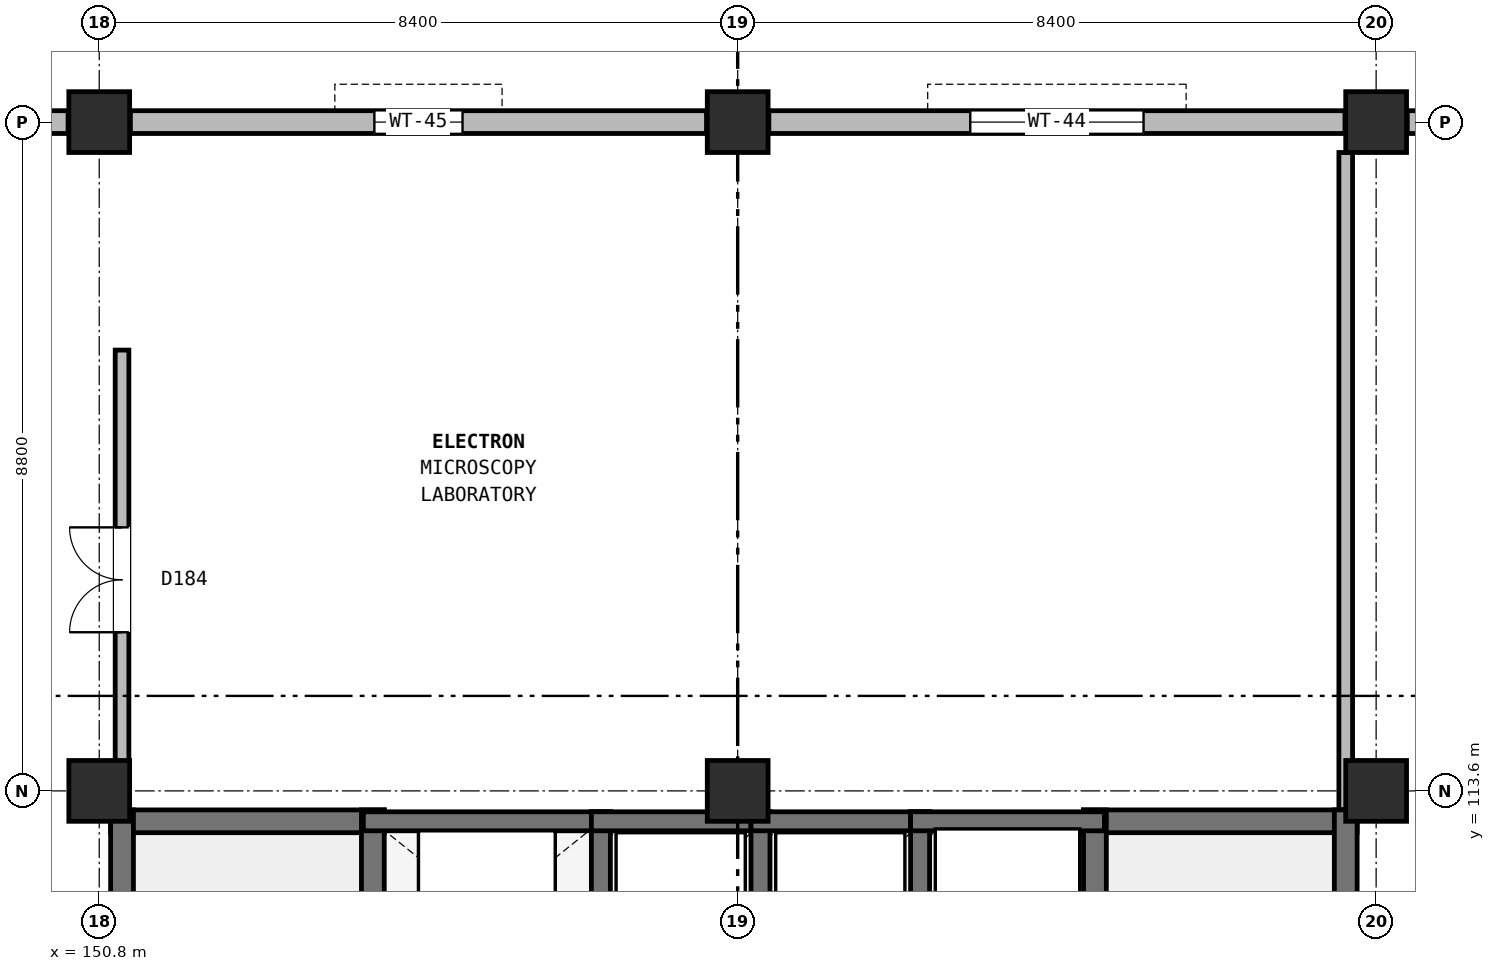
"""IFC4 building model, lengths in metres.
Left out: names, types, materials, properties, quantities, classifications, styles, units other than length and angle.
Written with IfcOpenShell. Run it as: python <this file> out.ifc"""

import sys

from ifc_helpers import new_model, si_unit, direction, frame, frame_2d, origin, origin_2d, place, context, subcontext, project, spatial, rectangle, extrude, element, fill, save


model = new_model("IFC4")
c1 = context("Model", 3, precision=1e-05, world=origin(), true_north=direction((0.0, 1.0)))
c2 = subcontext(c1, "Body", "Model", "MODEL_VIEW")
j1 = project(units=[si_unit("LENGTHUNIT", "METRE"), si_unit("PLANEANGLEUNIT", "RADIAN")], contexts=[c1])
p1 = place(None, origin())
s1 = spatial("IfcSite", under=j1, at=p1, CompositionType="ELEMENT")
p2 = place(p1, origin())
s2 = spatial("IfcBuilding", under=s1, at=p2, CompositionType="ELEMENT")
p3 = place(p2, frame((0.0, 0.0, 9.0)))
s3 = spatial("IfcBuildingStorey", under=s2, at=p3, CompositionType="ELEMENT", Elevation=9.0)
for number, where, z_axis, x_axis in (
    (1, (150.8, 113.6, 0.0), (0.0, 0.0, 1.0), (1.0, 0.0, 0.0)),
    (2, (150.8, 122.4, 0.0), (0.0, 0.0, 1.0), (1.0, 0.0, 0.0)),
    (3, (159.2, 113.6, 0.0), (0.0, 0.0, 1.0), (1.0, 0.0, 0.0)),
    (4, (159.2, 122.4, 0.0), (0.0, 0.0, 1.0), (1.0, 0.0, 0.0)),
    (5, (167.6, 113.6, 0.0), (0.0, 0.0, 1.0), (1.0, 0.0, 0.0)),
    (6, (167.6, 122.4, 0.0), (0.0, 0.0, 1.0), (1.0, 0.0, 0.0)),
):
    element("IfcColumn", number, at=place(p3, frame(where, z_axis=z_axis, x_axis=x_axis)), inside=s3, PredefinedType="COLUMN", context=c2, shape_type="SweptSolid", body=[
        extrude(rectangle(XDim=0.8, YDim=0.8, at=origin_2d()), origin(), (0.0, 0.0, 1.0), 4.2),
    ])
p4 = place(p3, frame((175.59, 122.4, 0.0), z_axis=(0.0, 0.0, 1.0), x_axis=(-1.0, 0.0, 0.0)))
e7 = element("IfcWall", 7, at=p4, inside=s3, PredefinedType="SOLIDWALL", context=c2, shape_type="SweptSolid", body=[
    extrude(rectangle(XDim=7.58, YDim=0.3, at=frame_2d((3.79, 0.0))), origin(), (0.0, 0.0, 1.0), 3.45),
])
p5 = place(p4, frame((1.005, 0.0, 0.9)))
e8 = element("IfcOpeningElement", 8, at=p5, cuts=e7, PredefinedType="OPENING", context=c2, shape_type="SweptSolid", body=[
    extrude(rectangle(XDim=1.98, YDim=2.32, at=frame_2d((0.99, 1.16))), frame((0.0, 0.16, 0.0), z_axis=(0.0, -1.0, 0.0), x_axis=(1.0, 0.0, 0.0)), (0.0, 0.0, 1.0), 0.32),
])
p6 = place(p3, frame((167.19, 122.4, 0.0), z_axis=(0.0, 0.0, 1.0), x_axis=(-1.0, 0.0, 0.0)))
e9 = element("IfcWall", 9, at=p6, inside=s3, PredefinedType="SOLIDWALL", context=c2, shape_type="SweptSolid", body=[
    extrude(rectangle(XDim=7.58, YDim=0.3, at=frame_2d((3.79, 0.0))), origin(), (0.0, 0.0, 1.0), 3.45),
])
p7 = place(p6, frame((2.65, 0.0, 0.9)))
e10 = element("IfcOpeningElement", 10, at=p7, cuts=e9, PredefinedType="OPENING", context=c2, shape_type="SweptSolid", body=[
    extrude(rectangle(XDim=2.28, YDim=2.36, at=frame_2d((1.14, 1.18))), frame((0.0, 0.16, 0.0), z_axis=(0.0, -1.0, 0.0), x_axis=(1.0, 0.0, 0.0)), (0.0, 0.0, 1.0), 0.32),
])
p8 = place(p3, frame((158.79, 122.4, 0.0), z_axis=(0.0, 0.0, 1.0), x_axis=(-1.0, 0.0, 0.0)))
e11 = element("IfcWall", 11, at=p8, inside=s3, PredefinedType="SOLIDWALL", context=c2, shape_type="SweptSolid", body=[
    extrude(rectangle(XDim=7.58, YDim=0.3, at=frame_2d((3.79, 0.0))), origin(), (0.0, 0.0, 1.0), 3.45),
])
p9 = place(p8, frame((3.21, 0.0, 0.9)))
e12 = element("IfcOpeningElement", 12, at=p9, cuts=e11, PredefinedType="OPENING", context=c2, shape_type="SweptSolid", body=[
    extrude(rectangle(XDim=1.16, YDim=1.74, at=frame_2d((0.58, 0.87))), frame((0.0, 0.16, 0.0), z_axis=(0.0, -1.0, 0.0), x_axis=(1.0, 0.0, 0.0)), (0.0, 0.0, 1.0), 0.32),
])
p10 = place(p3, frame((150.39, 122.4, 0.0), z_axis=(0.0, 0.0, 1.0), x_axis=(-1.0, 0.0, 0.0)))
e13 = element("IfcWall", 13, at=p10, inside=s3, PredefinedType="SOLIDWALL", context=c2, shape_type="SweptSolid", body=[
    extrude(rectangle(XDim=7.58, YDim=0.3, at=frame_2d((3.79, 0.0))), origin(), (0.0, 0.0, 1.0), 3.45),
])
p11 = place(p10, frame((3.13, 0.0, 0.9)))
e14 = element("IfcOpeningElement", 14, at=p11, cuts=e13, PredefinedType="OPENING", context=c2, shape_type="SweptSolid", body=[
    extrude(rectangle(XDim=1.32, YDim=1.78, at=frame_2d((0.66, 0.89))), frame((0.0, 0.16, 0.0), z_axis=(0.0, -1.0, 0.0), x_axis=(1.0, 0.0, 0.0)), (0.0, 0.0, 1.0), 0.32),
])
p12 = place(p3, frame((150.95, 113.2, 0.0), z_axis=(0.0, 0.0, 1.0), x_axis=(1.0, 0.0, 0.0)))
e15 = element("IfcWall", 15, at=p12, inside=s3, PredefinedType="SHEAR", context=c2, shape_type="SweptSolid", body=[
    extrude(rectangle(XDim=3.6, YDim=0.3, at=frame_2d((1.8, 0.0))), origin(), (0.0, 0.0, 1.0), 4.2),
])
p13 = place(p3, frame((151.1, 105.05, 0.0), z_axis=(0.0, 0.0, 1.0), x_axis=(0.0, 1.0, 0.0)))
e16 = element("IfcWall", 16, at=p13, inside=s3, PredefinedType="SHEAR", context=c2, shape_type="SweptSolid", body=[
    extrude(rectangle(XDim=8.3, YDim=0.3, at=frame_2d((4.15, 0.0))), origin(), (0.0, 0.0, 1.0), 4.2),
])
p14 = place(p3, frame((154.4, 105.05, 0.0), z_axis=(0.0, 0.0, 1.0), x_axis=(0.0, 1.0, 0.0)))
e17 = element("IfcWall", 17, at=p14, inside=s3, PredefinedType="SHEAR", context=c2, shape_type="SweptSolid", body=[
    extrude(rectangle(XDim=8.3, YDim=0.3, at=frame_2d((4.15, 0.0))), origin(), (0.0, 0.0, 1.0), 4.2),
])
p15 = place(p14, frame((0.45, 0.0, 0.0)))
e18 = element("IfcOpeningElement", 18, at=p15, cuts=e17, PredefinedType="OPENING", context=c2, shape_type="SweptSolid", body=[
    extrude(rectangle(XDim=1.1, YDim=2.2, at=frame_2d((0.55, 1.1))), frame((0.0, 0.16, 0.0), z_axis=(0.0, -1.0, 0.0), x_axis=(1.0, 0.0, 0.0)), (0.0, 0.0, 1.0), 0.32),
])
p16 = place(p3, frame((163.75, 113.2, 0.0), z_axis=(0.0, 0.0, 1.0), x_axis=(1.0, 0.0, 0.0)))
e19 = element("IfcWall", 19, at=p16, inside=s3, PredefinedType="SHEAR", context=c2, shape_type="SweptSolid", body=[
    extrude(rectangle(XDim=3.6, YDim=0.3, at=frame_2d((1.8, 0.0))), origin(), (0.0, 0.0, 1.0), 4.2),
])
for number, where, z_axis, x_axis in (
    (20, (163.9, 105.05, 0.0), (0.0, 0.0, 1.0), (0.0, 1.0, 0.0)),
    (21, (167.2, 105.05, 0.0), (0.0, 0.0, 1.0), (0.0, 1.0, 0.0)),
):
    element("IfcWall", number, at=place(p3, frame(where, z_axis=z_axis, x_axis=x_axis)), inside=s3, PredefinedType="SHEAR", context=c2, shape_type="SweptSolid", body=[
        extrude(rectangle(XDim=8.3, YDim=0.3, at=frame_2d((4.15, 0.0))), origin(), (0.0, 0.0, 1.0), 4.2),
    ])
p17 = place(p3, frame((154.275, 113.2, 0.0), z_axis=(0.0, 0.0, 1.0), x_axis=(1.0, 0.0, 0.0)))
e22 = element("IfcWall", 22, at=p17, inside=s3, PredefinedType="SOLIDWALL", context=c2, shape_type="SweptSolid", body=[
    extrude(rectangle(XDim=3.25, YDim=0.25, at=frame_2d((1.625, 0.0))), origin(), (0.0, 0.0, 1.0), 3.88),
])
p18 = place(p3, frame((157.4, 110.675, 0.0), z_axis=(0.0, 0.0, 1.0), x_axis=(0.0, 1.0, 0.0)))
e23 = element("IfcWall", 23, at=p18, inside=s3, PredefinedType="SOLIDWALL", context=c2, shape_type="SweptSolid", body=[
    extrude(rectangle(XDim=2.65, YDim=0.25, at=frame_2d((1.325, 0.0))), origin(), (0.0, 0.0, 1.0), 3.88),
])
p19 = place(p3, frame((157.275, 113.2, 0.0), z_axis=(0.0, 0.0, 1.0), x_axis=(1.0, 0.0, 0.0)))
e24 = element("IfcWall", 24, at=p19, inside=s3, PredefinedType="SOLIDWALL", context=c2, shape_type="SweptSolid", body=[
    extrude(rectangle(XDim=2.35, YDim=0.25, at=frame_2d((1.175, 0.0))), origin(), (0.0, 0.0, 1.0), 3.88),
])
p20 = place(p3, frame((159.5, 110.675, 0.0), z_axis=(0.0, 0.0, 1.0), x_axis=(0.0, 1.0, 0.0)))
e25 = element("IfcWall", 25, at=p20, inside=s3, PredefinedType="SOLIDWALL", context=c2, shape_type="SweptSolid", body=[
    extrude(rectangle(XDim=2.65, YDim=0.25, at=frame_2d((1.325, 0.0))), origin(), (0.0, 0.0, 1.0), 3.88),
])
p21 = place(p3, frame((159.375, 113.2, 0.0), z_axis=(0.0, 0.0, 1.0), x_axis=(1.0, 0.0, 0.0)))
e26 = element("IfcWall", 26, at=p21, inside=s3, PredefinedType="SOLIDWALL", context=c2, shape_type="SweptSolid", body=[
    extrude(rectangle(XDim=2.35, YDim=0.25, at=frame_2d((1.175, 0.0))), origin(), (0.0, 0.0, 1.0), 3.88),
])
p22 = place(p3, frame((161.6, 110.675, 0.0), z_axis=(0.0, 0.0, 1.0), x_axis=(0.0, 1.0, 0.0)))
e27 = element("IfcWall", 27, at=p22, inside=s3, PredefinedType="SOLIDWALL", context=c2, shape_type="SweptSolid", body=[
    extrude(rectangle(XDim=2.65, YDim=0.25, at=frame_2d((1.325, 0.0))), origin(), (0.0, 0.0, 1.0), 3.88),
])
p23 = place(p3, frame((161.475, 113.2, 0.0), z_axis=(0.0, 0.0, 1.0), x_axis=(1.0, 0.0, 0.0)))
e28 = element("IfcWall", 28, at=p23, inside=s3, PredefinedType="SOLIDWALL", context=c2, shape_type="SweptSolid", body=[
    extrude(rectangle(XDim=2.55, YDim=0.25, at=frame_2d((1.275, 0.0))), origin(), (0.0, 0.0, 1.0), 3.88),
])
p24 = place(p3, frame((151.1, 113.355, 0.0), z_axis=(0.0, 0.0, 1.0), x_axis=(0.0, 1.0, 0.0)))
e29 = element("IfcWall", 29, at=p24, inside=s3, PredefinedType="PARTITIONING", context=c2, shape_type="SweptSolid", body=[
    extrude(rectangle(XDim=6.045, YDim=0.18, at=frame_2d((3.022, 0.0))), origin(), (0.0, 0.0, 1.0), 3.245),
])
p25 = place(p24, frame((2.333, 0.0, 0.0)))
e30 = element("IfcOpeningElement", 30, at=p25, cuts=e29, PredefinedType="OPENING", context=c2, shape_type="SweptSolid", body=[
    extrude(rectangle(XDim=1.38, YDim=2.2, at=frame_2d((0.69, 1.1))), frame((0.0, 0.1, 0.0), z_axis=(0.0, -1.0, 0.0), x_axis=(1.0, 0.0, 0.0)), (0.0, 0.0, 1.0), 0.2),
])
p26 = place(p3, frame((167.2, 113.355, 0.0), z_axis=(0.0, 0.0, 1.0), x_axis=(0.0, 1.0, 0.0)))
e31 = element("IfcWall", 31, at=p26, inside=s3, PredefinedType="PARTITIONING", context=c2, shape_type="SweptSolid", body=[
    extrude(rectangle(XDim=8.645, YDim=0.18, at=frame_2d((4.323, 0.0))), origin(), (0.0, 0.0, 1.0), 3.245),
])
p27 = place(p7, origin())
e32 = element("IfcWindow", 32, at=p27, inside=s3, PartitioningType="SINGLE_PANEL", PredefinedType="WINDOW", context=c2, shape_type="SweptSolid", body=[
    extrude(rectangle(XDim=2.28, YDim=2.36, at=frame_2d((1.14, 1.18))), frame((0.0, 0.03, 0.0), z_axis=(0.0, -1.0, 0.0), x_axis=(1.0, 0.0, 0.0)), (0.0, 0.0, 1.0), 0.06),
])
fill(e10, e32)
p28 = place(p9, origin())
e33 = element("IfcWindow", 33, at=p28, inside=s3, PartitioningType="SINGLE_PANEL", PredefinedType="WINDOW", context=c2, shape_type="SweptSolid", body=[
    extrude(rectangle(XDim=1.16, YDim=1.74, at=frame_2d((0.58, 0.87))), frame((0.0, 0.03, 0.0), z_axis=(0.0, -1.0, 0.0), x_axis=(1.0, 0.0, 0.0)), (0.0, 0.0, 1.0), 0.06),
])
fill(e12, e33)
p29 = place(p25, origin())
e34 = element("IfcDoor", 34, at=p29, inside=s3, OperationType="DOUBLE_DOOR_SINGLE_SWING", PredefinedType="DOOR", context=c2, shape_type="SweptSolid", body=[
    extrude(rectangle(XDim=1.38, YDim=2.2, at=frame_2d((0.69, 1.1))), frame((0.0, 0.025, 0.0), z_axis=(0.0, -1.0, 0.0), x_axis=(1.0, 0.0, 0.0)), (0.0, 0.0, 1.0), 0.05),
])
fill(e30, e34)
save(model, sys.argv[1])
